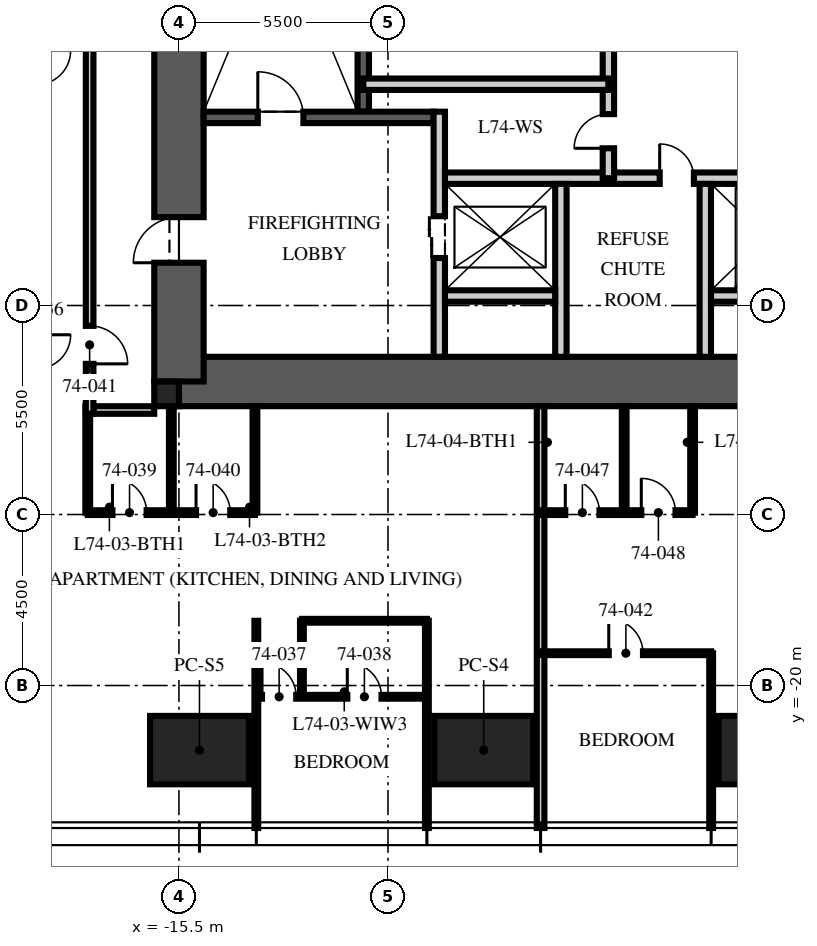
"""IFC4 building model, lengths in metres.
Left out: names, types, materials, properties, quantities, classifications, styles, units other than length and angle.
Written with IfcOpenShell. Run it as: python <this file> out.ifc"""

import sys

from ifc_helpers import new_model, si_unit, direction, frame, frame_2d, origin, origin_2d, place, context, subcontext, project, spatial, rectangle, extrude, element, fill, save


model = new_model("IFC4")
c1 = context("Model", 3, precision=1e-05, world=origin(), true_north=direction((0.0, 1.0)))
c2 = subcontext(c1, "Body", "Model", "MODEL_VIEW")
j1 = project(units=[si_unit("LENGTHUNIT", "METRE"), si_unit("PLANEANGLEUNIT", "RADIAN")], contexts=[c1])
p1 = place(None, origin())
s1 = spatial("IfcSite", under=j1, at=p1, CompositionType="ELEMENT")
p2 = place(p1, origin())
s2 = spatial("IfcBuilding", under=s1, at=p2, CompositionType="ELEMENT")
p3 = place(p2, frame((0.0, 0.0, 297.0)))
s3 = spatial("IfcBuildingStorey", under=s2, at=p3, CompositionType="ELEMENT", Elevation=297.0)
p4 = place(p3, frame((-15.5, -12.0, -0.25), z_axis=(0.0, 0.0, 1.0), x_axis=(1.0, 0.0, 0.0)))
e1 = element("IfcWall", 1, at=p4, inside=s3, PredefinedType="SHEAR", context=c2, shape_type="SweptSolid", body=[
    extrude(rectangle(XDim=31.0, YDim=1.3, at=frame_2d((15.5, 0.0))), origin(), (0.0, 0.0, 1.0), 3.75),
])
p5 = place(p3, frame((-15.5, -12.0, -0.25), z_axis=(0.0, 0.0, 1.0), x_axis=(0.0, 1.0, 0.0)))
e2 = element("IfcWall", 2, at=p5, inside=s3, PredefinedType="SHEAR", context=c2, shape_type="SweptSolid", body=[
    extrude(rectangle(XDim=24.0, YDim=1.3, at=frame_2d((12.0, 0.0))), origin(), (0.0, 0.0, 1.0), 3.75),
])
p6 = place(p5, frame((3.125, 0.0, 0.25)))
e3 = element("IfcOpeningElement", 3, at=p6, cuts=e2, PredefinedType="OPENING", context=c2, shape_type="SweptSolid", body=[
    extrude(rectangle(XDim=1.2, YDim=2.1, at=frame_2d((0.6, 1.05))), frame((0.0, 0.66, 0.0), z_axis=(0.0, -1.0, 0.0), x_axis=(1.0, 0.0, 0.0)), (0.0, 0.0, 1.0), 1.32),
])
p7 = place(p5, frame((19.375, 0.0, 0.25)))
e4 = element("IfcOpeningElement", 4, at=p7, cuts=e2, PredefinedType="OPENING", context=c2, shape_type="SweptSolid", body=[
    extrude(rectangle(XDim=1.8, YDim=2.1, at=frame_2d((0.9, 1.05))), frame((0.0, 0.66, 0.0), z_axis=(0.0, -1.0, 0.0), x_axis=(1.0, 0.0, 0.0)), (0.0, 0.0, 1.0), 1.32),
])
p8 = place(p3, frame((-15.825, -12.325, -0.25), z_axis=(0.0, 0.0, 1.0), x_axis=(1.0, 0.0, 0.0)))
e5 = element("IfcColumn", 5, at=p8, inside=s3, PredefinedType="COLUMN", context=c2, shape_type="SweptSolid", body=[
    extrude(rectangle(XDim=0.65, YDim=0.65, at=origin_2d()), origin(), (0.0, 0.0, 1.0), 3.75),
])
for number, where, z_axis, x_axis in (
    (6, (0.0, -21.7, 0.0), (0.0, 0.0, 1.0), (1.0, 0.0, 0.0)),
    (7, (-7.48, -21.7, 0.0), (0.0, 0.0, 1.0), (1.0, 0.0, 0.0)),
    (8, (-14.96, -21.7, 0.0), (0.0, 0.0, 1.0), (1.0, 0.0, 0.0)),
):
    element("IfcColumn", number, at=place(p3, frame(where, z_axis=z_axis, x_axis=x_axis)), inside=s3, PredefinedType="COLUMN", context=c2, shape_type="SweptSolid", body=[
        extrude(rectangle(XDim=2.6, YDim=1.8, at=origin_2d()), origin(), (0.0, 0.0, 1.0), 3.75),
    ])
p9 = place(p3, frame((-10.65, -4.9, 0.0), z_axis=(0.0, 0.0, 1.0), x_axis=(0.0, 1.0, 0.0)))
e9 = element("IfcWall", 9, at=p9, inside=s3, PredefinedType="SOLIDWALL", context=c2, shape_type="SweptSolid", body=[
    extrude(rectangle(XDim=10.1, YDim=0.3, at=frame_2d((5.05, 0.0))), origin(), (0.0, 0.0, 1.0), 3.5),
])
p10 = place(p3, frame((-14.85, -5.05, 0.0), z_axis=(0.0, 0.0, 1.0), x_axis=(1.0, 0.0, 0.0)))
e10 = element("IfcWall", 10, at=p10, inside=s3, PredefinedType="SOLIDWALL", context=c2, shape_type="SweptSolid", body=[
    extrude(rectangle(XDim=6.05, YDim=0.3, at=frame_2d((3.025, 0.0))), origin(), (0.0, 0.0, 1.0), 3.5),
])
p11 = place(p10, frame((1.425, 0.0, 0.0)))
e11 = element("IfcOpeningElement", 11, at=p11, cuts=e10, PredefinedType="OPENING", context=c2, shape_type="SweptSolid", body=[
    extrude(rectangle(XDim=1.2, YDim=2.1, at=frame_2d((0.6, 1.05))), frame((0.0, 0.16, 0.0), z_axis=(0.0, -1.0, 0.0), x_axis=(1.0, 0.0, 0.0)), (0.0, 0.0, 1.0), 0.32),
])
p12 = place(p3, frame((-8.65, -11.35, 0.0), z_axis=(0.0, 0.0, 1.0), x_axis=(0.0, 1.0, 0.0)))
e12 = element("IfcWall", 12, at=p12, inside=s3, PredefinedType="PARTITIONING", context=c2, shape_type="SweptSolid", body=[
    extrude(rectangle(XDim=6.45, YDim=0.3, at=frame_2d((3.225, 0.0))), origin(), (0.0, 0.0, 1.0), 3.5),
])
p13 = place(p12, frame((2.6, 0.0, 0.0)))
e13 = element("IfcOpeningElement", 13, at=p13, cuts=e12, PredefinedType="OPENING", context=c2, shape_type="SweptSolid", body=[
    extrude(rectangle(XDim=1.1, YDim=2.1, at=frame_2d((0.55, 1.05))), frame((0.0, 0.16, 0.0), z_axis=(0.0, -1.0, 0.0), x_axis=(1.0, 0.0, 0.0)), (0.0, 0.0, 1.0), 0.32),
])
p14 = place(p3, frame((-8.5, -6.65, 0.0), z_axis=(0.0, 0.0, 1.0), x_axis=(1.0, 0.0, 0.0)))
e14 = element("IfcWall", 14, at=p14, inside=s3, PredefinedType="PARTITIONING", context=c2, shape_type="SweptSolid", body=[
    extrude(rectangle(XDim=17.0, YDim=0.3, at=frame_2d((8.5, 0.0))), origin(), (0.0, 0.0, 1.0), 3.5),
])
p15 = place(p14, frame((7.8, 0.0, 0.0)))
e15 = element("IfcOpeningElement", 15, at=p15, cuts=e14, PredefinedType="OPENING", context=c2, shape_type="SweptSolid", body=[
    extrude(rectangle(XDim=1.3, YDim=2.4, at=frame_2d((0.65, 1.2))), frame((0.0, 0.16, 0.0), z_axis=(0.0, -1.0, 0.0), x_axis=(1.0, 0.0, 0.0)), (0.0, 0.0, 1.0), 0.32),
])
p16 = place(p14, frame((5.65, 0.0, 0.0)))
e16 = element("IfcOpeningElement", 16, at=p16, cuts=e14, PredefinedType="OPENING", context=c2, shape_type="SweptSolid", body=[
    extrude(rectangle(XDim=0.9, YDim=2.1, at=frame_2d((0.45, 1.05))), frame((0.0, 0.16, 0.0), z_axis=(0.0, -1.0, 0.0), x_axis=(1.0, 0.0, 0.0)), (0.0, 0.0, 1.0), 0.32),
])
p17 = place(p14, frame((10.4, 0.0, 0.0)))
e17 = element("IfcOpeningElement", 17, at=p17, cuts=e14, PredefinedType="OPENING", context=c2, shape_type="SweptSolid", body=[
    extrude(rectangle(XDim=0.9, YDim=2.1, at=frame_2d((0.45, 1.05))), frame((0.0, 0.16, 0.0), z_axis=(0.0, -1.0, 0.0), x_axis=(1.0, 0.0, 0.0)), (0.0, 0.0, 1.0), 0.32),
])
for number, where, z_axis, x_axis in (
    (18, (-5.45, -11.35, 0.0), (0.0, 0.0, 1.0), (0.0, 1.0, 0.0)),
    (19, (-1.65, -11.35, 0.0), (0.0, 0.0, 1.0), (0.0, 1.0, 0.0)),
):
    element("IfcWall", number, at=place(p3, frame(where, z_axis=z_axis, x_axis=x_axis)), inside=s3, PredefinedType="PARTITIONING", context=c2, shape_type="SweptSolid", body=[
        extrude(rectangle(XDim=4.55, YDim=0.3, at=frame_2d((2.275, 0.0))), origin(), (0.0, 0.0, 1.0), 3.5),
    ])
for number, where, z_axis, x_axis in (
    (20, (-8.5, -9.75, 0.0), (0.0, 0.0, 1.0), (1.0, 0.0, 0.0)),
    (21, (-1.5, -9.75, 0.0), (0.0, 0.0, 1.0), (1.0, 0.0, 0.0)),
):
    element("IfcWall", number, at=place(p3, frame(where, z_axis=z_axis, x_axis=x_axis)), inside=s3, PredefinedType="PARTITIONING", context=c2, shape_type="SweptSolid", body=[
        extrude(rectangle(XDim=2.9, YDim=0.3, at=frame_2d((1.45, 0.0))), origin(), (0.0, 0.0, 1.0), 3.5),
    ])
p18 = place(p3, frame((-4.2, -6.65, 0.0), z_axis=(0.0, 0.0, 1.0), x_axis=(0.0, 1.0, 0.0)))
e22 = element("IfcWall", 22, at=p18, inside=s3, PredefinedType="PARTITIONING", context=c2, shape_type="SweptSolid", body=[
    extrude(rectangle(XDim=10.25, YDim=0.3, at=frame_2d((5.125, 0.0))), origin(), (0.0, 0.0, 1.0), 3.5),
])
p19 = place(p18, frame((0.787, 0.0, 0.0)))
e23 = element("IfcOpeningElement", 23, at=p19, cuts=e22, PredefinedType="OPENING", context=c2, shape_type="SweptSolid", body=[
    extrude(rectangle(XDim=0.9, YDim=2.1, at=frame_2d((0.45, 1.05))), frame((0.0, 0.16, 0.0), z_axis=(0.0, -1.0, 0.0), x_axis=(1.0, 0.0, 0.0)), (0.0, 0.0, 1.0), 0.32),
])
p20 = place(p18, frame((5.912, 0.0, 0.0)))
e24 = element("IfcOpeningElement", 24, at=p20, cuts=e22, PredefinedType="OPENING", context=c2, shape_type="SweptSolid", body=[
    extrude(rectangle(XDim=0.9, YDim=2.1, at=frame_2d((0.45, 1.05))), frame((0.0, 0.16, 0.0), z_axis=(0.0, -1.0, 0.0), x_axis=(1.0, 0.0, 0.0)), (0.0, 0.0, 1.0), 0.32),
])
p21 = place(p3, frame((-10.65, -4.177, 0.0), z_axis=(0.0, 0.0, 1.0), x_axis=(1.0, 0.0, 0.0)))
e25 = element("IfcWall", 25, at=p21, inside=s3, PredefinedType="PARTITIONING", context=c2, shape_type="SweptSolid", body=[
    extrude(rectangle(XDim=6.45, YDim=0.3, at=frame_2d((3.225, 0.0))), origin(), (0.0, 0.0, 1.0), 3.5),
])
p22 = place(p3, frame((-16.15, -12.75, 0.0), z_axis=(0.0, 0.0, 1.0), x_axis=(-1.0, 0.0, 0.0)))
e26 = element("IfcWall", 26, at=p22, inside=s3, PredefinedType="PARTITIONING", context=c2, shape_type="SweptSolid", body=[
    extrude(rectangle(XDim=1.6, YDim=0.2, at=frame_2d((0.8, 0.0))), origin(), (0.0, 0.0, 1.0), 2.6),
])
for number, where, z_axis, x_axis in (
    (27, (-13.464, -18.296, 0.0), (0.0, 0.0, 1.0), (0.0, -1.0, 0.0)),
    (28, (-8.976, -18.296, 0.0), (0.0, 0.0, 1.0), (0.0, -1.0, 0.0)),
):
    element("IfcWall", number, at=place(p3, frame(where, z_axis=z_axis, x_axis=x_axis)), inside=s3, PredefinedType="PARTITIONING", context=c2, shape_type="SweptSolid", body=[
        extrude(rectangle(XDim=5.454, YDim=0.1, at=frame_2d((2.727, 0.0))), origin(), (0.0, 0.0, 1.0), 3.01),
    ])
p23 = place(p3, frame((-5.984, -12.65, 0.0), z_axis=(0.0, 0.0, 1.0), x_axis=(0.0, -1.0, 0.0)))
e29 = element("IfcWall", 29, at=p23, inside=s3, PredefinedType="PARTITIONING", context=c2, shape_type="SweptSolid", body=[
    extrude(rectangle(XDim=11.1, YDim=0.2, at=frame_2d((5.55, 0.0))), origin(), (0.0, 0.0, 1.0), 3.01),
])
p24 = place(p3, frame((-1.496, -19.15, 0.0), z_axis=(0.0, 0.0, 1.0), x_axis=(0.0, -1.0, 0.0)))
e30 = element("IfcWall", 30, at=p24, inside=s3, PredefinedType="PARTITIONING", context=c2, shape_type="SweptSolid", body=[
    extrude(rectangle(XDim=4.6, YDim=0.1, at=frame_2d((2.3, 0.0))), origin(), (0.0, 0.0, 1.0), 3.01),
])
p25 = place(p3, frame((-13.464, -20.296, 0.0), z_axis=(0.0, 0.0, 1.0), x_axis=(1.0, 0.0, 0.0)))
e31 = element("IfcWall", 31, at=p25, inside=s3, PredefinedType="PARTITIONING", context=c2, shape_type="SweptSolid", body=[
    extrude(rectangle(XDim=4.488, YDim=0.1, at=frame_2d((2.244, 0.0))), origin(), (0.0, 0.0, 1.0), 2.91),
])
p26 = place(p25, frame((0.15, 0.0, 0.0)))
e32 = element("IfcOpeningElement", 32, at=p26, cuts=e31, PredefinedType="OPENING", context=c2, shape_type="SweptSolid", body=[
    extrude(rectangle(XDim=0.9, YDim=2.1, at=frame_2d((0.45, 1.05))), frame((0.0, 0.06, 0.0), z_axis=(0.0, -1.0, 0.0), x_axis=(1.0, 0.0, 0.0)), (0.0, 0.0, 1.0), 0.12),
])
p27 = place(p25, frame((2.394, 0.0, 0.0)))
e33 = element("IfcOpeningElement", 33, at=p27, cuts=e31, PredefinedType="OPENING", context=c2, shape_type="SweptSolid", body=[
    extrude(rectangle(XDim=0.9, YDim=2.1, at=frame_2d((0.45, 1.05))), frame((0.0, 0.06, 0.0), z_axis=(0.0, -1.0, 0.0), x_axis=(1.0, 0.0, 0.0)), (0.0, 0.0, 1.0), 0.12),
])
p28 = place(p3, frame((-12.264, -18.296, 0.0), z_axis=(0.0, 0.0, 1.0), x_axis=(0.0, -1.0, 0.0)))
e34 = element("IfcWall", 34, at=p28, inside=s3, PredefinedType="PARTITIONING", context=c2, shape_type="SweptSolid", body=[
    extrude(rectangle(XDim=2.0, YDim=0.1, at=frame_2d((1.0, 0.0))), origin(), (0.0, 0.0, 1.0), 3.5),
])
p29 = place(p3, frame((-12.264, -18.296, 0.0), z_axis=(0.0, 0.0, 1.0), x_axis=(1.0, 0.0, 0.0)))
e35 = element("IfcWall", 35, at=p29, inside=s3, PredefinedType="PARTITIONING", context=c2, shape_type="SweptSolid", body=[
    extrude(rectangle(XDim=3.288, YDim=0.1, at=frame_2d((1.644, 0.0))), origin(), (0.0, 0.0, 1.0), 2.91),
])
p30 = place(p3, frame((-17.9, -15.45, 0.0), z_axis=(0.0, 0.0, 1.0), x_axis=(1.0, 0.0, 0.0)))
e36 = element("IfcWall", 36, at=p30, inside=s3, PredefinedType="PARTITIONING", context=c2, shape_type="SweptSolid", body=[
    extrude(rectangle(XDim=4.4, YDim=0.125, at=frame_2d((2.2, 0.0))), origin(), (0.0, 0.0, 1.0), 2.6),
])
p31 = place(p30, frame((0.65, 0.0, 0.0)))
e37 = element("IfcOpeningElement", 37, at=p31, cuts=e36, PredefinedType="OPENING", context=c2, shape_type="SweptSolid", body=[
    extrude(rectangle(XDim=0.9, YDim=2.1, at=frame_2d((0.45, 1.05))), frame((0.0, 0.073, 0.0), z_axis=(0.0, -1.0, 0.0), x_axis=(1.0, 0.0, 0.0)), (0.0, 0.0, 1.0), 0.145),
])
p32 = place(p30, frame((2.85, 0.0, 0.0)))
e38 = element("IfcOpeningElement", 38, at=p32, cuts=e36, PredefinedType="OPENING", context=c2, shape_type="SweptSolid", body=[
    extrude(rectangle(XDim=0.9, YDim=2.1, at=frame_2d((0.45, 1.05))), frame((0.0, 0.073, 0.0), z_axis=(0.0, -1.0, 0.0), x_axis=(1.0, 0.0, 0.0)), (0.0, 0.0, 1.0), 0.145),
])
p33 = place(p3, frame((-17.9, -12.65, 0.0), z_axis=(0.0, 0.0, 1.0), x_axis=(0.0, -1.0, 0.0)))
e39 = element("IfcWall", 39, at=p33, inside=s3, PredefinedType="PARTITIONING", context=c2, shape_type="SweptSolid", body=[
    extrude(rectangle(XDim=2.8, YDim=0.125, at=frame_2d((1.4, 0.0))), origin(), (0.0, 0.0, 1.0), 2.9),
])
p34 = place(p3, frame((-15.7, -12.65, 0.0), z_axis=(0.0, 0.0, 1.0), x_axis=(0.0, -1.0, 0.0)))
e40 = element("IfcWall", 40, at=p34, inside=s3, PredefinedType="PARTITIONING", context=c2, shape_type="SweptSolid", body=[
    extrude(rectangle(XDim=2.8, YDim=0.125, at=frame_2d((1.4, 0.0))), origin(), (0.0, 0.0, 1.0), 2.6),
])
p35 = place(p3, frame((-13.5, -12.65, 0.0), z_axis=(0.0, 0.0, 1.0), x_axis=(0.0, -1.0, 0.0)))
e41 = element("IfcWall", 41, at=p35, inside=s3, PredefinedType="PARTITIONING", context=c2, shape_type="SweptSolid", body=[
    extrude(rectangle(XDim=2.8, YDim=0.125, at=frame_2d((1.4, 0.0))), origin(), (0.0, 0.0, 1.0), 3.5),
])
p36 = place(p3, frame((-5.984, -19.15, 0.0), z_axis=(0.0, 0.0, 1.0), x_axis=(1.0, 0.0, 0.0)))
e42 = element("IfcWall", 42, at=p36, inside=s3, PredefinedType="PARTITIONING", context=c2, shape_type="SweptSolid", body=[
    extrude(rectangle(XDim=4.488, YDim=0.1, at=frame_2d((2.244, 0.0))), origin(), (0.0, 0.0, 1.0), 2.91),
])
p37 = place(p36, frame((1.794, 0.0, 0.0)))
e43 = element("IfcOpeningElement", 43, at=p37, cuts=e42, PredefinedType="OPENING", context=c2, shape_type="SweptSolid", body=[
    extrude(rectangle(XDim=0.9, YDim=2.1, at=frame_2d((0.45, 1.05))), frame((0.0, 0.06, 0.0), z_axis=(0.0, -1.0, 0.0), x_axis=(1.0, 0.0, 0.0)), (0.0, 0.0, 1.0), 0.12),
])
p38 = place(p3, frame((-5.984, -15.45, 0.0), z_axis=(0.0, 0.0, 1.0), x_axis=(1.0, 0.0, 0.0)))
e44 = element("IfcWall", 44, at=p38, inside=s3, PredefinedType="PARTITIONING", context=c2, shape_type="SweptSolid", body=[
    extrude(rectangle(XDim=4.0, YDim=0.125, at=frame_2d((2.0, 0.0))), origin(), (0.0, 0.0, 1.0), 2.91),
])
p39 = place(p38, frame((0.65, 0.0, 0.0)))
e45 = element("IfcOpeningElement", 45, at=p39, cuts=e44, PredefinedType="OPENING", context=c2, shape_type="SweptSolid", body=[
    extrude(rectangle(XDim=0.9, YDim=2.1, at=frame_2d((0.45, 1.05))), frame((0.0, 0.073, 0.0), z_axis=(0.0, -1.0, 0.0), x_axis=(1.0, 0.0, 0.0)), (0.0, 0.0, 1.0), 0.145),
])
p40 = place(p38, frame((2.65, 0.0, 0.0)))
e46 = element("IfcOpeningElement", 46, at=p40, cuts=e44, PredefinedType="OPENING", context=c2, shape_type="SweptSolid", body=[
    extrude(rectangle(XDim=0.9, YDim=2.1, at=frame_2d((0.45, 1.05))), frame((0.0, 0.073, 0.0), z_axis=(0.0, -1.0, 0.0), x_axis=(1.0, 0.0, 0.0)), (0.0, 0.0, 1.0), 0.145),
])
p41 = place(p3, frame((-3.784, -12.65, 0.0), z_axis=(0.0, 0.0, 1.0), x_axis=(0.0, -1.0, 0.0)))
e47 = element("IfcWall", 47, at=p41, inside=s3, PredefinedType="PARTITIONING", context=c2, shape_type="SweptSolid", body=[
    extrude(rectangle(XDim=2.8, YDim=0.125, at=frame_2d((1.4, 0.0))), origin(), (0.0, 0.0, 1.0), 2.91),
])
p42 = place(p3, frame((-1.984, -12.65, 0.0), z_axis=(0.0, 0.0, 1.0), x_axis=(0.0, -1.0, 0.0)))
e48 = element("IfcWall", 48, at=p42, inside=s3, PredefinedType="PARTITIONING", context=c2, shape_type="SweptSolid", body=[
    extrude(rectangle(XDim=2.8, YDim=0.125, at=frame_2d((1.4, 0.0))), origin(), (0.0, 0.0, 1.0), 3.5),
])
p43 = place(p3, frame((-17.85, 12.65, 0.0), z_axis=(0.0, 0.0, 1.0), x_axis=(0.0, -1.0, 0.0)))
e49 = element("IfcWall", 49, at=p43, inside=s3, PredefinedType="PARTITIONING", context=c2, shape_type="SweptSolid", body=[
    extrude(rectangle(XDim=25.5, YDim=0.2, at=frame_2d((12.75, 0.0))), origin(), (0.0, 0.0, 1.0), 2.9),
])
p44 = place(p43, frame((4.9, 0.0, 0.0)))
e50 = element("IfcOpeningElement", 50, at=p44, cuts=e49, PredefinedType="OPENING", context=c2, shape_type="SweptSolid", body=[
    extrude(rectangle(XDim=1.0, YDim=2.2, at=frame_2d((0.5, 1.1))), frame((0.0, 0.11, 0.0), z_axis=(0.0, -1.0, 0.0), x_axis=(1.0, 0.0, 0.0)), (0.0, 0.0, 1.0), 0.22),
])
p45 = place(p43, frame((23.186, 0.0, 0.0)))
e51 = element("IfcOpeningElement", 51, at=p45, cuts=e49, PredefinedType="OPENING", context=c2, shape_type="SweptSolid", body=[
    extrude(rectangle(XDim=1.0, YDim=2.2, at=frame_2d((0.5, 1.1))), frame((0.0, 0.11, 0.0), z_axis=(0.0, -1.0, 0.0), x_axis=(1.0, 0.0, 0.0)), (0.0, 0.0, 1.0), 0.22),
])
p46 = place(p11, origin())
e52 = element("IfcDoor", 52, at=p46, inside=s3, OperationType="SINGLE_SWING_LEFT", PredefinedType="DOOR", context=c2, shape_type="SweptSolid", body=[
    extrude(rectangle(XDim=1.2, YDim=2.1, at=frame_2d((0.6, 1.05))), frame((0.0, 0.025, 0.0), z_axis=(0.0, -1.0, 0.0), x_axis=(1.0, 0.0, 0.0)), (0.0, 0.0, 1.0), 0.05),
])
fill(e11, e52)
p47 = place(p6, origin())
e53 = element("IfcDoor", 53, at=p47, inside=s3, OperationType="SINGLE_SWING_LEFT", PredefinedType="DOOR", context=c2, shape_type="SweptSolid", body=[
    extrude(rectangle(XDim=1.2, YDim=2.1, at=frame_2d((0.6, 1.05))), frame((0.0, 0.025, 0.0), z_axis=(0.0, -1.0, 0.0), x_axis=(1.0, 0.0, 0.0)), (0.0, 0.0, 1.0), 0.05),
])
fill(e3, e53)
p48 = place(p13, origin())
e54 = element("IfcDoor", 54, at=p48, inside=s3, OperationType="DOUBLE_DOOR_SLIDING", PredefinedType="DOOR", context=c2, shape_type="SweptSolid", body=[
    extrude(rectangle(XDim=1.1, YDim=2.1, at=frame_2d((0.55, 1.05))), frame((0.0, 0.025, 0.0), z_axis=(0.0, -1.0, 0.0), x_axis=(1.0, 0.0, 0.0)), (0.0, 0.0, 1.0), 0.05),
])
fill(e13, e54)
p49 = place(p16, origin())
e55 = element("IfcDoor", 55, at=p49, inside=s3, OperationType="SINGLE_SWING_LEFT", PredefinedType="DOOR", context=c2, shape_type="SweptSolid", body=[
    extrude(rectangle(XDim=0.9, YDim=2.1, at=frame_2d((0.45, 1.05))), frame((0.0, 0.025, 0.0), z_axis=(0.0, -1.0, 0.0), x_axis=(1.0, 0.0, 0.0)), (0.0, 0.0, 1.0), 0.05),
])
fill(e16, e55)
p50 = place(p19, origin())
e56 = element("IfcDoor", 56, at=p50, inside=s3, OperationType="SINGLE_SWING_LEFT", PredefinedType="DOOR", context=c2, shape_type="SweptSolid", body=[
    extrude(rectangle(XDim=0.9, YDim=2.1, at=frame_2d((0.45, 1.05))), frame((0.0, 0.025, 0.0), z_axis=(0.0, -1.0, 0.0), x_axis=(1.0, 0.0, 0.0)), (0.0, 0.0, 1.0), 0.05),
])
fill(e23, e56)
p51 = place(p26, origin())
e57 = element("IfcDoor", 57, at=p51, inside=s3, OperationType="SINGLE_SWING_LEFT", PredefinedType="DOOR", context=c2, shape_type="SweptSolid", body=[
    extrude(rectangle(XDim=0.9, YDim=2.1, at=frame_2d((0.45, 1.05))), frame((0.0, 0.025, 0.0), z_axis=(0.0, -1.0, 0.0), x_axis=(1.0, 0.0, 0.0)), (0.0, 0.0, 1.0), 0.05),
])
fill(e32, e57)
p52 = place(p27, origin())
e58 = element("IfcDoor", 58, at=p52, inside=s3, OperationType="SINGLE_SWING_LEFT", PredefinedType="DOOR", context=c2, shape_type="SweptSolid", body=[
    extrude(rectangle(XDim=0.9, YDim=2.1, at=frame_2d((0.45, 1.05))), frame((0.0, 0.025, 0.0), z_axis=(0.0, -1.0, 0.0), x_axis=(1.0, 0.0, 0.0)), (0.0, 0.0, 1.0), 0.05),
])
fill(e33, e58)
p53 = place(p31, origin())
e59 = element("IfcDoor", 59, at=p53, inside=s3, OperationType="SINGLE_SWING_LEFT", PredefinedType="DOOR", context=c2, shape_type="SweptSolid", body=[
    extrude(rectangle(XDim=0.9, YDim=2.1, at=frame_2d((0.45, 1.05))), frame((0.0, 0.025, 0.0), z_axis=(0.0, -1.0, 0.0), x_axis=(1.0, 0.0, 0.0)), (0.0, 0.0, 1.0), 0.05),
])
fill(e37, e59)
p54 = place(p32, origin())
e60 = element("IfcDoor", 60, at=p54, inside=s3, OperationType="SINGLE_SWING_LEFT", PredefinedType="DOOR", context=c2, shape_type="SweptSolid", body=[
    extrude(rectangle(XDim=0.9, YDim=2.1, at=frame_2d((0.45, 1.05))), frame((0.0, 0.025, 0.0), z_axis=(0.0, -1.0, 0.0), x_axis=(1.0, 0.0, 0.0)), (0.0, 0.0, 1.0), 0.05),
])
fill(e38, e60)
p55 = place(p45, origin())
e61 = element("IfcDoor", 61, at=p55, inside=s3, OperationType="SINGLE_SWING_RIGHT", PredefinedType="DOOR", context=c2, shape_type="SweptSolid", body=[
    extrude(rectangle(XDim=1.0, YDim=2.2, at=frame_2d((0.5, 1.1))), frame((0.0, 0.025, 0.0), z_axis=(0.0, -1.0, 0.0), x_axis=(1.0, 0.0, 0.0)), (0.0, 0.0, 1.0), 0.05),
])
fill(e51, e61)
p56 = place(p37, origin())
e62 = element("IfcDoor", 62, at=p56, inside=s3, OperationType="SINGLE_SWING_LEFT", PredefinedType="DOOR", context=c2, shape_type="SweptSolid", body=[
    extrude(rectangle(XDim=0.9, YDim=2.1, at=frame_2d((0.45, 1.05))), frame((0.0, 0.025, 0.0), z_axis=(0.0, -1.0, 0.0), x_axis=(1.0, 0.0, 0.0)), (0.0, 0.0, 1.0), 0.05),
])
fill(e43, e62)
p57 = place(p39, origin())
e63 = element("IfcDoor", 63, at=p57, inside=s3, OperationType="SINGLE_SWING_LEFT", PredefinedType="DOOR", context=c2, shape_type="SweptSolid", body=[
    extrude(rectangle(XDim=0.9, YDim=2.1, at=frame_2d((0.45, 1.05))), frame((0.0, 0.025, 0.0), z_axis=(0.0, -1.0, 0.0), x_axis=(1.0, 0.0, 0.0)), (0.0, 0.0, 1.0), 0.05),
])
fill(e45, e63)
p58 = place(p40, origin())
e64 = element("IfcDoor", 64, at=p58, inside=s3, OperationType="SINGLE_SWING_LEFT", PredefinedType="DOOR", context=c2, shape_type="SweptSolid", body=[
    extrude(rectangle(XDim=0.9, YDim=2.1, at=frame_2d((0.45, 1.05))), frame((0.0, 0.025, 0.0), z_axis=(0.0, -1.0, 0.0), x_axis=(1.0, 0.0, 0.0)), (0.0, 0.0, 1.0), 0.05),
])
fill(e46, e64)
save(model, sys.argv[1])
